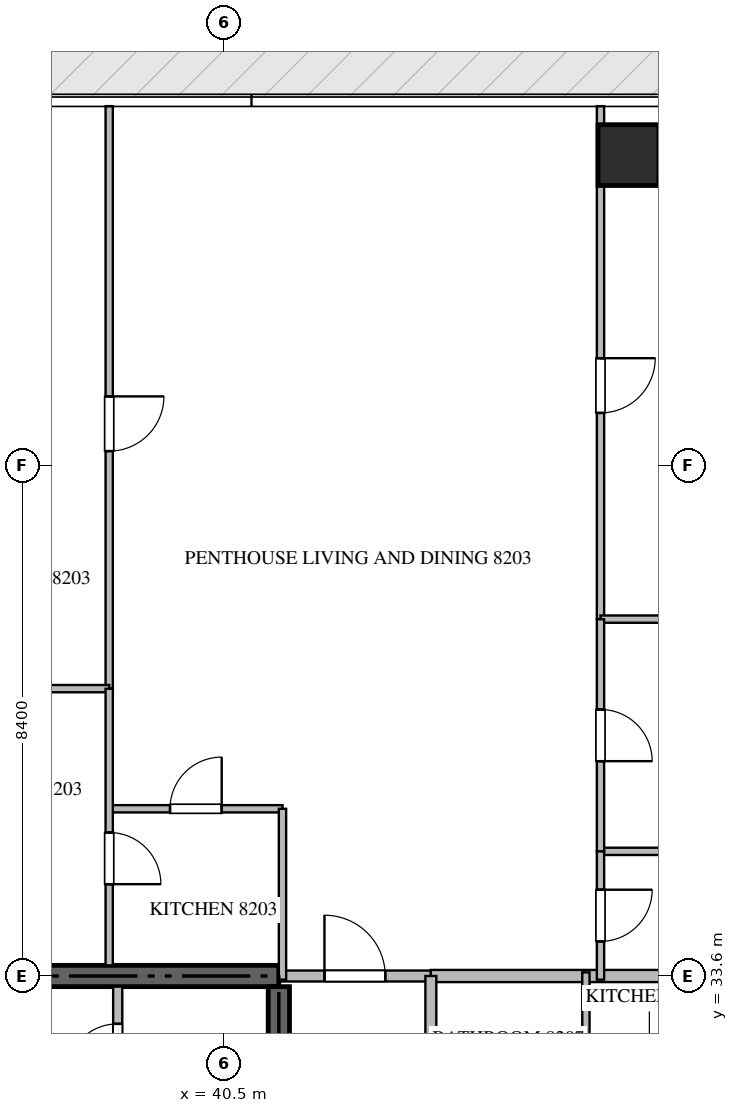
"""IFC4 building model, lengths in metres.
Left out: names, types, materials, properties, quantities, classifications, styles, units other than length and angle.
Written with IfcOpenShell. Run it as: python <this file> out.ifc"""

import sys

from ifc_helpers import new_model, si_unit, direction, frame, frame_2d, origin, origin_2d, place, context, subcontext, project, spatial, rectangle, extrude, source, transform, mapped, element, fill, save


model = new_model("IFC4")
c1 = context("Model", 3, precision=1e-05, world=origin(), true_north=direction((0.0, 1.0)))
c2 = subcontext(c1, "Body", "Model", "MODEL_VIEW")
j1 = project(units=[si_unit("LENGTHUNIT", "METRE"), si_unit("PLANEANGLEUNIT", "RADIAN")], contexts=[c1])
p1 = place(None, origin())
s1 = spatial("IfcSite", under=j1, at=p1, CompositionType="ELEMENT")
p2 = place(p1, origin())
s2 = spatial("IfcBuilding", under=s1, at=p2, CompositionType="ELEMENT")
p3 = place(p2, frame((0.0, 0.0, 329.9)))
s3 = spatial("IfcBuildingStorey", under=s2, at=p3, CompositionType="ELEMENT", Elevation=329.9)
p4 = place(p3, frame((41.4, 33.6, -0.26), z_axis=(0.0, 0.0, 1.0), x_axis=(-1.0, 0.0, 0.0)))
e1 = element("IfcWall", 1, at=p4, inside=s3, PredefinedType="SHEAR", context=c2, shape_type="SweptSolid", body=[
    extrude(rectangle(XDim=18.0, YDim=0.35, at=frame_2d((9.0, 0.0))), origin(), (0.0, 0.0, 1.0), 4.048),
])
p5 = place(p3, frame((41.4, 27.75, -0.26), z_axis=(0.0, 0.0, 1.0), x_axis=(0.0, 1.0, 0.0)))
e2 = element("IfcWall", 2, at=p5, inside=s3, PredefinedType="SHEAR", context=c2, shape_type="SweptSolid", body=[
    extrude(rectangle(XDim=5.675, YDim=0.35, at=frame_2d((2.837, 0.0))), origin(), (0.0, 0.0, 1.0), 4.048),
])
m1 = source(origin(), c2, "Body", "SweptSolid", [
    extrude(rectangle(XDim=1.0, YDim=1.0, at=origin_2d()), origin(), (0.0, 0.0, 1.0), 4.05),
])
p6 = place(p3, frame((47.15, 47.1, -0.26), z_axis=(0.0, 0.0, 1.0), x_axis=(1.0, 0.0, 0.0)))
e3 = element("IfcColumn", 3, at=p6, inside=s3, PredefinedType="COLUMN", context=c2, shape_type="MappedRepresentation", body=[
    mapped(m1, transform((0.0, 0.0, 0.0), scale=1.0)),
])
p7 = place(p3, frame((38.75, 31.352, 0.0), z_axis=(0.0, 0.0, 1.0), x_axis=(0.0, 1.0, 0.0)))
e4 = element("IfcWall", 4, at=p7, inside=s3, PredefinedType="PARTITIONING", context=c2, shape_type="SweptSolid", body=[
    extrude(rectangle(XDim=2.073, YDim=0.15, at=frame_2d((1.037, 0.0))), origin(), (0.0, 0.0, 1.0), 3.79),
])
p8 = place(p7, frame((0.611, 0.0, 0.0)))
e5 = element("IfcOpeningElement", 5, at=p8, cuts=e4, PredefinedType="OPENING", context=c2, shape_type="SweptSolid", body=[
    extrude(rectangle(XDim=0.85, YDim=2.1, at=frame_2d((0.425, 1.05))), frame((0.0, 0.085, 0.0), z_axis=(0.0, -1.0, 0.0), x_axis=(1.0, 0.0, 0.0)), (0.0, 0.0, 1.0), 0.17),
])
p9 = place(p3, frame((43.9, 33.6, 0.0), z_axis=(0.0, 0.0, 1.0), x_axis=(1.0, 0.0, 0.0)))
e6 = element("IfcWall", 6, at=p9, inside=s3, PredefinedType="PARTITIONING", context=c2, shape_type="SweptSolid", body=[
    extrude(rectangle(XDim=11.618, YDim=0.2, at=frame_2d((5.809, 0.0))), origin(), (0.0, 0.0, 1.0), 3.79),
])
p10 = place(p3, frame((41.402, 33.6, 0.0), z_axis=(0.0, 0.0, 1.0), x_axis=(1.0, 0.0, 0.0)))
e7 = element("IfcWall", 7, at=p10, inside=s3, PredefinedType="PARTITIONING", context=c2, shape_type="SweptSolid", body=[
    extrude(rectangle(XDim=2.496, YDim=0.18, at=frame_2d((1.248, 0.0))), origin(), (0.0, 0.0, 1.0), 3.79),
])
p11 = place(p10, frame((0.748, 0.0, 0.0)))
e8 = element("IfcOpeningElement", 8, at=p11, cuts=e7, PredefinedType="OPENING", context=c2, shape_type="SweptSolid", body=[
    extrude(rectangle(XDim=1.0, YDim=2.15, at=frame_2d((0.5, 1.075))), frame((0.0, 0.1, 0.0), z_axis=(0.0, -1.0, 0.0), x_axis=(1.0, 0.0, 0.0)), (0.0, 0.0, 1.0), 0.2),
])
p12 = place(p3, frame((43.9, 16.8, 0.0), z_axis=(0.0, 0.0, 1.0), x_axis=(0.0, 1.0, 0.0)))
e9 = element("IfcWall", 9, at=p12, inside=s3, PredefinedType="PARTITIONING", context=c2, shape_type="SweptSolid", body=[
    extrude(rectangle(XDim=16.8, YDim=0.18, at=frame_2d((8.4, 0.0))), origin(), (0.0, 0.0, 1.0), 3.79),
])
p13 = place(p12, frame((2.575, 0.0, 0.0)))
e10 = element("IfcOpeningElement", 10, at=p13, cuts=e9, PredefinedType="OPENING", context=c2, shape_type="SweptSolid", body=[
    extrude(rectangle(XDim=1.0, YDim=2.15, at=frame_2d((0.5, 1.075))), frame((0.0, 0.1, 0.0), z_axis=(0.0, -1.0, 0.0), x_axis=(1.0, 0.0, 0.0)), (0.0, 0.0, 1.0), 0.2),
])
p14 = place(p12, frame((10.997, 0.0, 0.0)))
e11 = element("IfcOpeningElement", 11, at=p14, cuts=e9, PredefinedType="OPENING", context=c2, shape_type="SweptSolid", body=[
    extrude(rectangle(XDim=1.0, YDim=2.15, at=frame_2d((0.5, 1.075))), frame((0.0, 0.1, 0.0), z_axis=(0.0, -1.0, 0.0), x_axis=(1.0, 0.0, 0.0)), (0.0, 0.0, 1.0), 0.2),
])
p15 = place(p3, frame((38.61, 36.35, 0.0), z_axis=(0.0, 0.0, 1.0), x_axis=(1.0, 0.0, 0.0)))
e12 = element("IfcWall", 12, at=p15, inside=s3, PredefinedType="PARTITIONING", context=c2, shape_type="SweptSolid", body=[
    extrude(rectangle(XDim=2.85, YDim=0.12, at=frame_2d((1.425, 0.0))), origin(), (0.0, 0.0, 1.0), 3.79),
])
p16 = place(p15, frame((1.0, 0.0, 0.0)))
e13 = element("IfcOpeningElement", 13, at=p16, cuts=e12, PredefinedType="OPENING", context=c2, shape_type="SweptSolid", body=[
    extrude(rectangle(XDim=0.85, YDim=2.1, at=frame_2d((0.425, 1.05))), frame((0.0, 0.07, 0.0), z_axis=(0.0, -1.0, 0.0), x_axis=(1.0, 0.0, 0.0)), (0.0, 0.0, 1.0), 0.14),
])
p17 = place(p3, frame((41.46, 36.35, 0.0), z_axis=(0.0, 0.0, 1.0), x_axis=(0.0, -1.0, 0.0)))
e14 = element("IfcWall", 14, at=p17, inside=s3, PredefinedType="PARTITIONING", context=c2, shape_type="SweptSolid", body=[
    extrude(rectangle(XDim=2.81, YDim=0.12, at=frame_2d((1.405, 0.0))), origin(), (0.0, 0.0, 1.0), 3.79),
])
p18 = place(p3, frame((38.61, 47.905, 0.0), z_axis=(0.0, 0.0, 1.0), x_axis=(0.0, -1.0, 0.0)))
e15 = element("IfcWall", 15, at=p18, inside=s3, PredefinedType="PARTITIONING", context=c2, shape_type="SweptSolid", body=[
    extrude(rectangle(XDim=9.579, YDim=0.12, at=frame_2d((4.79, 0.0))), origin(), (0.0, 0.0, 1.0), 3.79),
])
p19 = place(p18, frame((4.773, 0.0, 0.0)))
e16 = element("IfcOpeningElement", 16, at=p19, cuts=e15, PredefinedType="OPENING", context=c2, shape_type="SweptSolid", body=[
    extrude(rectangle(XDim=0.9, YDim=2.1, at=frame_2d((0.45, 1.05))), frame((0.0, 0.07, 0.0), z_axis=(0.0, -1.0, 0.0), x_axis=(1.0, 0.0, 0.0)), (0.0, 0.0, 1.0), 0.14),
])
p20 = place(p3, frame((34.14, 38.326, 0.0), z_axis=(0.0, 0.0, 1.0), x_axis=(1.0, 0.0, 0.0)))
e17 = element("IfcWall", 17, at=p20, inside=s3, PredefinedType="PARTITIONING", context=c2, shape_type="SweptSolid", body=[
    extrude(rectangle(XDim=4.47, YDim=0.12, at=frame_2d((2.235, 0.0))), origin(), (0.0, 0.0, 1.0), 3.79),
])
p21 = place(p3, frame((38.61, 38.324, 0.0), z_axis=(0.0, 0.0, 1.0), x_axis=(0.0, -1.0, 0.0)))
e18 = element("IfcWall", 18, at=p21, inside=s3, PredefinedType="PARTITIONING", context=c2, shape_type="SweptSolid", body=[
    extrude(rectangle(XDim=4.549, YDim=0.12, at=frame_2d((2.274, 0.0))), origin(), (0.0, 0.0, 1.0), 3.79),
])
p22 = place(p21, frame((2.364, 0.0, 0.0)))
e19 = element("IfcOpeningElement", 19, at=p22, cuts=e18, PredefinedType="OPENING", context=c2, shape_type="SweptSolid", body=[
    extrude(rectangle(XDim=0.85, YDim=2.1, at=frame_2d((0.425, 1.05))), frame((0.0, 0.07, 0.0), z_axis=(0.0, -1.0, 0.0), x_axis=(1.0, 0.0, 0.0)), (0.0, 0.0, 1.0), 0.14),
])
p23 = place(p3, frame((46.69, 47.905, 0.0), z_axis=(0.0, 0.0, 1.0), x_axis=(0.0, -1.0, 0.0)))
e20 = element("IfcWall", 20, at=p23, inside=s3, PredefinedType="PARTITIONING", context=c2, shape_type="SweptSolid", body=[
    extrude(rectangle(XDim=8.436, YDim=0.12, at=frame_2d((4.218, 0.0))), origin(), (0.0, 0.0, 1.0), 3.79),
])
p24 = place(p23, frame((4.145, 0.0, 0.0)))
e21 = element("IfcOpeningElement", 21, at=p24, cuts=e20, PredefinedType="OPENING", context=c2, shape_type="SweptSolid", body=[
    extrude(rectangle(XDim=0.9, YDim=2.1, at=frame_2d((0.45, 1.05))), frame((0.0, 0.07, 0.0), z_axis=(0.0, -1.0, 0.0), x_axis=(1.0, 0.0, 0.0)), (0.0, 0.0, 1.0), 0.14),
])
p25 = place(p3, frame((46.69, 39.469, 0.0), z_axis=(0.0, 0.0, 1.0), x_axis=(1.0, 0.0, 0.0)))
e22 = element("IfcWall", 22, at=p25, inside=s3, PredefinedType="PARTITIONING", context=c2, shape_type="SweptSolid", body=[
    extrude(rectangle(XDim=8.815, YDim=0.12, at=frame_2d((4.407, 0.0))), origin(), (0.0, 0.0, 1.0), 3.292),
])
p26 = place(p3, frame((46.69, 35.65, 0.0), z_axis=(0.0, 0.0, 1.0), x_axis=(1.0, 0.0, 0.0)))
e23 = element("IfcWall", 23, at=p26, inside=s3, PredefinedType="PARTITIONING", context=c2, shape_type="SweptSolid", body=[
    extrude(rectangle(XDim=8.815, YDim=0.12, at=frame_2d((4.407, 0.0))), origin(), (0.0, 0.0, 1.0), 3.79),
])
p27 = place(p3, frame((46.69, 39.467, 0.0), z_axis=(0.0, 0.0, 1.0), x_axis=(0.0, -1.0, 0.0)))
e24 = element("IfcWall", 24, at=p27, inside=s3, PredefinedType="PARTITIONING", context=c2, shape_type="SweptSolid", body=[
    extrude(rectangle(XDim=3.817, YDim=0.12, at=frame_2d((1.909, 0.0))), origin(), (0.0, 0.0, 1.0), 3.79),
])
p28 = place(p27, frame((1.484, 0.0, 0.0)))
e25 = element("IfcOpeningElement", 25, at=p28, cuts=e24, PredefinedType="OPENING", context=c2, shape_type="SweptSolid", body=[
    extrude(rectangle(XDim=0.85, YDim=2.1, at=frame_2d((0.425, 1.05))), frame((0.0, 0.07, 0.0), z_axis=(0.0, -1.0, 0.0), x_axis=(1.0, 0.0, 0.0)), (0.0, 0.0, 1.0), 0.14),
])
p29 = place(p3, frame((46.69, 35.648, 0.0), z_axis=(0.0, 0.0, 1.0), x_axis=(0.0, -1.0, 0.0)))
e26 = element("IfcWall", 26, at=p29, inside=s3, PredefinedType="PARTITIONING", context=c2, shape_type="SweptSolid", body=[
    extrude(rectangle(XDim=2.108, YDim=0.12, at=frame_2d((1.054, 0.0))), origin(), (0.0, 0.0, 1.0), 3.79),
])
p30 = place(p29, frame((0.629, 0.0, 0.0)))
e27 = element("IfcOpeningElement", 27, at=p30, cuts=e26, PredefinedType="OPENING", context=c2, shape_type="SweptSolid", body=[
    extrude(rectangle(XDim=0.85, YDim=2.1, at=frame_2d((0.425, 1.05))), frame((0.0, 0.07, 0.0), z_axis=(0.0, -1.0, 0.0), x_axis=(1.0, 0.0, 0.0)), (0.0, 0.0, 1.0), 0.14),
])
p31 = place(p3, frame((46.45, 31.0, 0.0), z_axis=(0.0, 0.0, 1.0), x_axis=(0.0, 1.0, 0.0)))
e28 = element("IfcWall", 28, at=p31, inside=s3, PredefinedType="PARTITIONING", context=c2, shape_type="SweptSolid", body=[
    extrude(rectangle(XDim=2.66, YDim=0.12, at=frame_2d((1.33, 0.0))), origin(), (0.0, 0.0, 1.0), 3.79),
])
m2 = source(origin(), c2, "Body", "SweptSolid", [
    extrude(rectangle(XDim=0.85, YDim=2.1, at=frame_2d((0.425, 1.05))), frame((0.0, 0.025, 0.0), z_axis=(0.0, -1.0, 0.0), x_axis=(1.0, 0.0, 0.0)), (0.0, 0.0, 1.0), 0.05),
])
p32 = place(p8, origin())
e29 = element("IfcDoor", 29, at=p32, inside=s3, OperationType="SINGLE_SWING_LEFT", PredefinedType="DOOR", context=c2, shape_type="MappedRepresentation", body=[
    mapped(m2, transform((0.0, 0.0, 0.0), scale=1.0)),
])
fill(e5, e29)
m3 = source(origin(), c2, "Body", "SweptSolid", [
    extrude(rectangle(XDim=1.0, YDim=2.15, at=frame_2d((0.5, 1.075))), frame((0.0, 0.025, 0.0), z_axis=(0.0, -1.0, 0.0), x_axis=(1.0, 0.0, 0.0)), (0.0, 0.0, 1.0), 0.05),
])
p33 = place(p11, origin())
e30 = element("IfcDoor", 30, at=p33, inside=s3, OperationType="SINGLE_SWING_LEFT", PredefinedType="DOOR", context=c2, shape_type="MappedRepresentation", body=[
    mapped(m3, transform((0.0, 0.0, 0.0), scale=1.0)),
])
fill(e8, e30)
p34 = place(p16, origin())
e31 = element("IfcDoor", 31, at=p34, inside=s3, OperationType="SINGLE_SWING_RIGHT", PredefinedType="DOOR", context=c2, shape_type="MappedRepresentation", body=[
    mapped(m2, transform((0.0, 0.0, 0.0), scale=1.0)),
])
fill(e13, e31)
m4 = source(origin(), c2, "Body", "SweptSolid", [
    extrude(rectangle(XDim=0.9, YDim=2.1, at=frame_2d((0.45, 1.05))), frame((0.0, 0.025, 0.0), z_axis=(0.0, -1.0, 0.0), x_axis=(1.0, 0.0, 0.0)), (0.0, 0.0, 1.0), 0.05),
])
p35 = place(p19, origin())
e32 = element("IfcDoor", 32, at=p35, inside=s3, OperationType="SINGLE_SWING_LEFT", PredefinedType="DOOR", context=c2, shape_type="MappedRepresentation", body=[
    mapped(m4, transform((0.0, 0.0, 0.0), scale=1.0)),
])
fill(e16, e32)
p36 = place(p22, origin())
e33 = element("IfcDoor", 33, at=p36, inside=s3, OperationType="SINGLE_SWING_RIGHT", PredefinedType="DOOR", context=c2, shape_type="MappedRepresentation", body=[
    mapped(m2, transform((0.0, 0.0, 0.0), scale=1.0)),
])
fill(e19, e33)
p37 = place(p24, origin())
e34 = element("IfcDoor", 34, at=p37, inside=s3, OperationType="SINGLE_SWING_LEFT", PredefinedType="DOOR", context=c2, shape_type="MappedRepresentation", body=[
    mapped(m4, transform((0.0, 0.0, 0.0), scale=1.0)),
])
fill(e21, e34)
p38 = place(p28, origin())
e35 = element("IfcDoor", 35, at=p38, inside=s3, OperationType="SINGLE_SWING_RIGHT", PredefinedType="DOOR", context=c2, shape_type="MappedRepresentation", body=[
    mapped(m2, transform((0.0, 0.0, 0.0), scale=1.0)),
])
fill(e25, e35)
p39 = place(p30, origin())
e36 = element("IfcDoor", 36, at=p39, inside=s3, OperationType="SINGLE_SWING_LEFT", PredefinedType="DOOR", context=c2, shape_type="MappedRepresentation", body=[
    mapped(m2, transform((0.0, 0.0, 0.0), scale=1.0)),
])
fill(e27, e36)
save(model, sys.argv[1])
